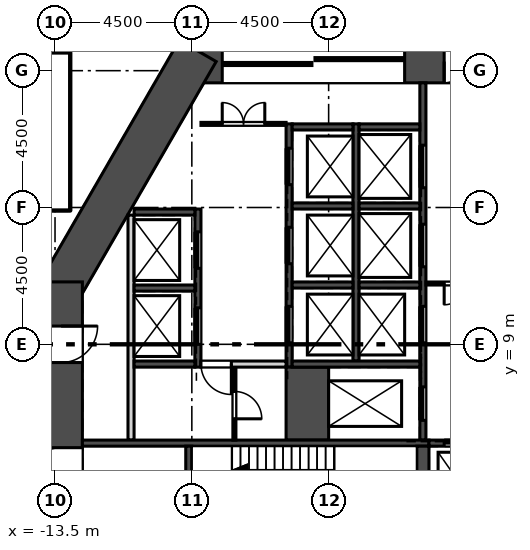
"""IFC4 building model, lengths in metres.
Left out: names, types, materials, properties, quantities, classifications, styles, units other than length and angle.
Written with IfcOpenShell. Run it as: python <this file> out.ifc"""

import sys

from ifc_helpers import new_model, si_unit, direction, frame, frame_2d, origin, place, context, subcontext, project, spatial, rectangle, extrude, element, fill, save


model = new_model("IFC4")
c1 = context("Model", 3, precision=1e-05, world=origin(), true_north=direction((0.0, 1.0)))
c2 = subcontext(c1, "Body", "Model", "MODEL_VIEW")
j1 = project(units=[si_unit("LENGTHUNIT", "METRE"), si_unit("PLANEANGLEUNIT", "RADIAN")], contexts=[c1])
p1 = place(None, origin())
s1 = spatial("IfcSite", under=j1, at=p1, CompositionType="ELEMENT")
p2 = place(p1, origin())
s2 = spatial("IfcBuilding", under=s1, at=p2, CompositionType="ELEMENT")
p3 = place(p2, origin())
s3 = spatial("IfcBuildingStorey", under=s2, at=p3, CompositionType="ELEMENT", Elevation=0.0)
p4 = place(p3, frame((9.412, 18.3, 0.0), z_axis=(0.0, 0.0, 1.0), x_axis=(-1.0, 0.0, 0.0)))
e1 = element("IfcWall", 1, at=p4, inside=s3, PredefinedType="SHEAR", context=c2, shape_type="SweptSolid", body=[
    extrude(rectangle(XDim=18.823, YDim=1.4, at=frame_2d((9.412, 0.0))), origin(), (0.0, 0.0, 1.0), 8.0),
])
p5 = place(p4, frame((8.711, 0.0, 0.0)))
e2 = element("IfcOpeningElement", 2, at=p5, cuts=e1, PredefinedType="OPENING", context=c2, shape_type="SweptSolid", body=[
    extrude(rectangle(XDim=1.4, YDim=2.1, at=frame_2d((0.7, 1.05))), frame((0.0, 0.71, 0.0), z_axis=(0.0, -1.0, 0.0), x_axis=(1.0, 0.0, 0.0)), (0.0, 0.0, 1.0), 1.42),
])
p6 = place(p4, frame((11.412, 0.0, 0.0)))
e3 = element("IfcOpeningElement", 3, at=p6, cuts=e1, PredefinedType="OPENING", context=c2, shape_type="SweptSolid", body=[
    extrude(rectangle(XDim=6.0, YDim=2.4, at=frame_2d((3.0, 1.2))), frame((0.0, 0.71, 0.0), z_axis=(0.0, -1.0, 0.0), x_axis=(1.0, 0.0, 0.0)), (0.0, 0.0, 1.0), 1.42),
])
p7 = place(p4, frame((1.412, 0.0, 0.0)))
e4 = element("IfcOpeningElement", 4, at=p7, cuts=e1, PredefinedType="OPENING", context=c2, shape_type="SweptSolid", body=[
    extrude(rectangle(XDim=6.0, YDim=2.4, at=frame_2d((3.0, 1.2))), frame((0.0, 0.71, 0.0), z_axis=(0.0, -1.0, 0.0), x_axis=(1.0, 0.0, 0.0)), (0.0, 0.0, 1.0), 1.42),
])
p8 = place(p3, frame((-8.805, 18.65, 0.0), z_axis=(0.0, 0.0, 1.0), x_axis=(-0.50000187635, -0.866024320471, 0.0)))
e5 = element("IfcWall", 5, at=p8, inside=s3, PredefinedType="SHEAR", context=c2, shape_type="SweptSolid", body=[
    extrude(rectangle(XDim=9.177, YDim=1.4, at=frame_2d((4.588, 0.0))), origin(), (0.0, 0.0, 1.0), 8.0),
])
p9 = place(p3, frame((-13.3, 11.052, 0.0), z_axis=(0.0, 0.0, 1.0), x_axis=(0.0, -1.0, 0.0)))
e6 = element("IfcWall", 6, at=p9, inside=s3, PredefinedType="SHEAR", context=c2, shape_type="SweptSolid", body=[
    extrude(rectangle(XDim=10.202, YDim=1.4, at=frame_2d((5.101, 0.0))), origin(), (0.0, 0.0, 1.0), 8.0),
])
p10 = place(p9, frame((5.453, 0.0, 0.0)))
e7 = element("IfcOpeningElement", 7, at=p10, cuts=e6, PredefinedType="OPENING", context=c2, shape_type="SweptSolid", body=[
    extrude(rectangle(XDim=1.2, YDim=2.1, at=frame_2d((0.6, 1.05))), frame((0.0, 0.71, 0.0), z_axis=(0.0, -1.0, 0.0), x_axis=(1.0, 0.0, 0.0)), (0.0, 0.0, 1.0), 1.42),
])
p11 = place(p9, frame((1.453, 0.0, 0.0)))
e8 = element("IfcOpeningElement", 8, at=p11, cuts=e6, PredefinedType="OPENING", context=c2, shape_type="SweptSolid", body=[
    extrude(rectangle(XDim=1.2, YDim=2.1, at=frame_2d((0.6, 1.05))), frame((0.0, 0.71, 0.0), z_axis=(0.0, -1.0, 0.0), x_axis=(1.0, 0.0, 0.0)), (0.0, 0.0, 1.0), 1.42),
])
p12 = place(p3, frame((-11.0, 5.85, 0.0), z_axis=(0.0, 0.0, 1.0), x_axis=(0.0, 1.0, 0.0)))
e9 = element("IfcWall", 9, at=p12, inside=s3, PredefinedType="SOLIDWALL", context=c2, shape_type="SweptSolid", body=[
    extrude(rectangle(XDim=7.4, YDim=0.2, at=frame_2d((3.7, 0.0))), origin(), (0.0, 0.0, 1.0), 7.7),
])
p13 = place(p3, frame((-8.8, 8.25, -0.4), z_axis=(0.0, 0.0, 1.0), x_axis=(0.0, 1.0, 0.0)))
e10 = element("IfcWall", 10, at=p13, inside=s3, PredefinedType="SOLIDWALL", context=c2, shape_type="SweptSolid", body=[
    extrude(rectangle(XDim=5.2, YDim=0.2, at=frame_2d((2.6, 0.0))), origin(), (0.0, 0.0, 1.0), 8.1),
])
p14 = place(p13, frame((0.75, 0.0, 0.4)))
e11 = element("IfcOpeningElement", 11, at=p14, cuts=e10, PredefinedType="OPENING", context=c2, shape_type="SweptSolid", body=[
    extrude(rectangle(XDim=1.2, YDim=2.1, at=frame_2d((0.6, 1.05))), frame((0.0, 0.11, 0.0), z_axis=(0.0, -1.0, 0.0), x_axis=(1.0, 0.0, 0.0)), (0.0, 0.0, 1.0), 0.22),
])
p15 = place(p13, frame((3.25, 0.0, 0.4)))
e12 = element("IfcOpeningElement", 12, at=p15, cuts=e10, PredefinedType="OPENING", context=c2, shape_type="SweptSolid", body=[
    extrude(rectangle(XDim=1.2, YDim=2.1, at=frame_2d((0.6, 1.05))), frame((0.0, 0.11, 0.0), z_axis=(0.0, -1.0, 0.0), x_axis=(1.0, 0.0, 0.0)), (0.0, 0.0, 1.0), 0.22),
])
p16 = place(p3, frame((-5.8, 8.25, -0.4), z_axis=(0.0, 0.0, 1.0), x_axis=(0.0, 1.0, 0.0)))
e13 = element("IfcWall", 13, at=p16, inside=s3, PredefinedType="SOLIDWALL", context=c2, shape_type="SweptSolid", body=[
    extrude(rectangle(XDim=8.0, YDim=0.2, at=frame_2d((4.0, 0.0))), origin(), (0.0, 0.0, 1.0), 8.1),
])
p17 = place(p16, frame((0.8, 0.0, 0.4)))
e14 = element("IfcOpeningElement", 14, at=p17, cuts=e13, PredefinedType="OPENING", context=c2, shape_type="SweptSolid", body=[
    extrude(rectangle(XDim=1.2, YDim=2.1, at=frame_2d((0.6, 1.05))), frame((0.0, 0.11, 0.0), z_axis=(0.0, -1.0, 0.0), x_axis=(1.0, 0.0, 0.0)), (0.0, 0.0, 1.0), 0.22),
])
p18 = place(p16, frame((3.4, 0.0, 0.4)))
e15 = element("IfcOpeningElement", 15, at=p18, cuts=e13, PredefinedType="OPENING", context=c2, shape_type="SweptSolid", body=[
    extrude(rectangle(XDim=1.2, YDim=2.1, at=frame_2d((0.6, 1.05))), frame((0.0, 0.11, 0.0), z_axis=(0.0, -1.0, 0.0), x_axis=(1.0, 0.0, 0.0)), (0.0, 0.0, 1.0), 0.22),
])
p19 = place(p16, frame((6.0, 0.0, 0.4)))
e16 = element("IfcOpeningElement", 16, at=p19, cuts=e13, PredefinedType="OPENING", context=c2, shape_type="SweptSolid", body=[
    extrude(rectangle(XDim=1.2, YDim=2.1, at=frame_2d((0.6, 1.05))), frame((0.0, 0.11, 0.0), z_axis=(0.0, -1.0, 0.0), x_axis=(1.0, 0.0, 0.0)), (0.0, 0.0, 1.0), 0.22),
])
p20 = place(p3, frame((-3.6, 8.45, -0.4), z_axis=(0.0, 0.0, 1.0), x_axis=(0.0, 1.0, 0.0)))
e17 = element("IfcWall", 17, at=p20, inside=s3, PredefinedType="SOLIDWALL", context=c2, shape_type="SweptSolid", body=[
    extrude(rectangle(XDim=7.8, YDim=0.2, at=frame_2d((3.9, 0.0))), origin(), (0.0, 0.0, 1.0), 8.1),
])
p21 = place(p3, frame((-1.4, 5.85, -0.4), z_axis=(0.0, 0.0, 1.0), x_axis=(0.0, 1.0, 0.0)))
e18 = element("IfcWall", 18, at=p21, inside=s3, PredefinedType="SOLIDWALL", context=c2, shape_type="SweptSolid", body=[
    extrude(rectangle(XDim=11.75, YDim=0.2, at=frame_2d((5.875, 0.0))), origin(), (0.0, 0.0, 1.0), 8.1),
])
p22 = place(p21, frame((3.2, 0.0, 0.4)))
e19 = element("IfcOpeningElement", 19, at=p22, cuts=e18, PredefinedType="OPENING", context=c2, shape_type="SweptSolid", body=[
    extrude(rectangle(XDim=1.2, YDim=2.1, at=frame_2d((0.6, 1.05))), frame((0.0, 0.11, 0.0), z_axis=(0.0, -1.0, 0.0), x_axis=(1.0, 0.0, 0.0)), (0.0, 0.0, 1.0), 0.22),
])
p23 = place(p21, frame((5.7, 0.0, 0.4)))
e20 = element("IfcOpeningElement", 20, at=p23, cuts=e18, PredefinedType="OPENING", context=c2, shape_type="SweptSolid", body=[
    extrude(rectangle(XDim=1.4, YDim=2.1, at=frame_2d((0.7, 1.05))), frame((0.0, 0.11, 0.0), z_axis=(0.0, -1.0, 0.0), x_axis=(1.0, 0.0, 0.0)), (0.0, 0.0, 1.0), 0.22),
])
p24 = place(p21, frame((8.3, 0.0, 0.4)))
e21 = element("IfcOpeningElement", 21, at=p24, cuts=e18, PredefinedType="OPENING", context=c2, shape_type="SweptSolid", body=[
    extrude(rectangle(XDim=1.4, YDim=2.1, at=frame_2d((0.7, 1.05))), frame((0.0, 0.11, 0.0), z_axis=(0.0, -1.0, 0.0), x_axis=(1.0, 0.0, 0.0)), (0.0, 0.0, 1.0), 0.22),
])
p25 = place(p21, frame((0.65, 0.0, 0.4)))
e22 = element("IfcOpeningElement", 22, at=p25, cuts=e18, PredefinedType="OPENING", context=c2, shape_type="SweptSolid", body=[
    extrude(rectangle(XDim=1.1, YDim=2.1, at=frame_2d((0.55, 1.05))), frame((0.0, 0.11, 0.0), z_axis=(0.0, -1.0, 0.0), x_axis=(1.0, 0.0, 0.0)), (0.0, 0.0, 1.0), 0.22),
])
p26 = place(p3, frame((-5.2, 5.85, -0.4), z_axis=(0.0, 0.0, 1.0), x_axis=(0.0, 1.0, 0.0)))
e23 = element("IfcWall", 23, at=p26, inside=s3, PredefinedType="SOLIDWALL", context=c2, shape_type="SweptSolid", body=[
    extrude(rectangle(XDim=2.4, YDim=1.4, at=frame_2d((1.2, 0.0))), origin(), (0.0, 0.0, 1.0), 8.1),
])
p27 = place(p3, frame((-10.9, 8.35, -0.4), z_axis=(0.0, 0.0, 1.0), x_axis=(1.0, 0.0, 0.0)))
e24 = element("IfcWall", 24, at=p27, inside=s3, PredefinedType="SOLIDWALL", context=c2, shape_type="SweptSolid", body=[
    extrude(rectangle(XDim=2.0, YDim=0.2, at=frame_2d((1.0, 0.0))), origin(), (0.0, 0.0, 1.0), 8.1),
])
p28 = place(p3, frame((-5.7, 8.35, -0.4), z_axis=(0.0, 0.0, 1.0), x_axis=(1.0, 0.0, 0.0)))
e25 = element("IfcWall", 25, at=p28, inside=s3, PredefinedType="SOLIDWALL", context=c2, shape_type="SweptSolid", body=[
    extrude(rectangle(XDim=4.2, YDim=0.2, at=frame_2d((2.1, 0.0))), origin(), (0.0, 0.0, 1.0), 8.1),
])
p29 = place(p3, frame((-12.6, 5.75, -0.4), z_axis=(0.0, 0.0, 1.0), x_axis=(1.0, 0.0, 0.0)))
e26 = element("IfcWall", 26, at=p29, inside=s3, PredefinedType="SOLIDWALL", context=c2, shape_type="SweptSolid", body=[
    extrude(rectangle(XDim=11.4, YDim=0.2, at=frame_2d((5.7, 0.0))), origin(), (0.0, 0.0, 1.0), 8.1),
])
p30 = place(p3, frame((-1.2, 5.75, -0.4), z_axis=(0.0, 0.0, 1.0), x_axis=(1.0, 0.0, 0.0)))
e27 = element("IfcWall", 27, at=p30, inside=s3, PredefinedType="SOLIDWALL", context=c2, shape_type="SweptSolid", body=[
    extrude(rectangle(XDim=2.4, YDim=0.2, at=frame_2d((1.2, 0.0))), origin(), (0.0, 0.0, 1.0), 8.1),
])
p31 = place(p30, frame((0.5, 0.0, 0.4)))
e28 = element("IfcOpeningElement", 28, at=p31, cuts=e27, PredefinedType="OPENING", context=c2, shape_type="SweptSolid", body=[
    extrude(rectangle(XDim=1.4, YDim=2.1, at=frame_2d((0.7, 1.05))), frame((0.0, 0.11, 0.0), z_axis=(0.0, -1.0, 0.0), x_axis=(1.0, 0.0, 0.0)), (0.0, 0.0, 1.0), 0.22),
])
p32 = place(p3, frame((-9.1, 2.25, -0.4), z_axis=(0.0, 0.0, 1.0), x_axis=(0.0, 1.0, 0.0)))
e29 = element("IfcWall", 29, at=p32, inside=s3, PredefinedType="SOLIDWALL", context=c2, shape_type="SweptSolid", body=[
    extrude(rectangle(XDim=3.4, YDim=0.2, at=frame_2d((1.7, 0.0))), origin(), (0.0, 0.0, 1.0), 8.1),
])
p33 = place(p32, frame((0.2, 0.0, 0.4)))
e30 = element("IfcOpeningElement", 30, at=p33, cuts=e29, PredefinedType="OPENING", context=c2, shape_type="SweptSolid", body=[
    extrude(rectangle(XDim=1.2, YDim=2.1, at=frame_2d((0.6, 1.05))), frame((0.0, 0.11, 0.0), z_axis=(0.0, -1.0, 0.0), x_axis=(1.0, 0.0, 0.0)), (0.0, 0.0, 1.0), 0.22),
])
p34 = place(p3, frame((-1.4, 2.25, -0.4), z_axis=(0.0, 0.0, 1.0), x_axis=(0.0, 1.0, 0.0)))
e31 = element("IfcWall", 31, at=p34, inside=s3, PredefinedType="SOLIDWALL", context=c2, shape_type="SweptSolid", body=[
    extrude(rectangle(XDim=3.4, YDim=0.4, at=frame_2d((1.7, 0.0))), origin(), (0.0, 0.0, 1.0), 8.1),
])
for number, where, z_axis, x_axis in (
    (32, (-10.9, 10.85, -0.4), (0.0, 0.0, 1.0), (1.0, 0.0, 0.0)),
    (33, (-10.9, 13.35, -0.4), (0.0, 0.0, 1.0), (1.0, 0.0, 0.0)),
    (34, (-5.7, 10.95, -0.4), (0.0, 0.0, 1.0), (1.0, 0.0, 0.0)),
    (35, (-5.7, 13.55, -0.4), (0.0, 0.0, 1.0), (1.0, 0.0, 0.0)),
    (36, (-5.7, 16.15, -0.4), (0.0, 0.0, 1.0), (1.0, 0.0, 0.0)),
    (37, (-3.5, 10.95, -0.4), (0.0, 0.0, 1.0), (1.0, 0.0, 0.0)),
    (38, (-3.5, 13.55, -0.4), (0.0, 0.0, 1.0), (1.0, 0.0, 0.0)),
    (39, (-3.5, 16.15, -0.4), (0.0, 0.0, 1.0), (1.0, 0.0, 0.0)),
):
    element("IfcWall", number, at=place(p3, frame(where, z_axis=z_axis, x_axis=x_axis)), inside=s3, PredefinedType="SOLIDWALL", context=c2, shape_type="SweptSolid", body=[
        extrude(rectangle(XDim=2.0, YDim=0.2, at=frame_2d((1.0, 0.0))), origin(), (0.0, 0.0, 1.0), 8.1),
    ])
p35 = place(p3, frame((-8.7, 16.25, 0.0), z_axis=(0.0, 0.0, 1.0), x_axis=(1.0, 0.0, 0.0)))
e40 = element("IfcWall", 40, at=p35, inside=s3, PredefinedType="PARTITIONING", context=c2, shape_type="SweptSolid", body=[
    extrude(rectangle(XDim=2.8, YDim=0.1, at=frame_2d((1.4, 0.0))), origin(), (0.0, 0.0, 1.0), 7.7),
])
p36 = place(p35, frame((0.7, 0.0, 0.0)))
e41 = element("IfcOpeningElement", 41, at=p36, cuts=e40, PredefinedType="OPENING", context=c2, shape_type="SweptSolid", body=[
    extrude(rectangle(XDim=1.4, YDim=2.1, at=frame_2d((0.7, 1.05))), frame((0.0, 0.06, 0.0), z_axis=(0.0, -1.0, 0.0), x_axis=(1.0, 0.0, 0.0)), (0.0, 0.0, 1.0), 0.12),
])
p37 = place(p3, frame((-7.6, 5.85, 0.0), z_axis=(0.0, 0.0, 1.0), x_axis=(0.0, 1.0, 0.0)))
e42 = element("IfcWall", 42, at=p37, inside=s3, PredefinedType="PARTITIONING", context=c2, shape_type="SweptSolid", body=[
    extrude(rectangle(XDim=2.4, YDim=0.1, at=frame_2d((1.2, 0.0))), origin(), (0.0, 0.0, 1.0), 7.7),
])
p38 = place(p37, frame((0.7, 0.0, 0.0)))
e43 = element("IfcOpeningElement", 43, at=p38, cuts=e42, PredefinedType="OPENING", context=c2, shape_type="SweptSolid", body=[
    extrude(rectangle(XDim=0.9, YDim=2.1, at=frame_2d((0.45, 1.05))), frame((0.0, 0.06, 0.0), z_axis=(0.0, -1.0, 0.0), x_axis=(1.0, 0.0, 0.0)), (0.0, 0.0, 1.0), 0.12),
])
p39 = place(p3, frame((-8.7, 8.35, 0.0), z_axis=(0.0, 0.0, 1.0), x_axis=(1.0, 0.0, 0.0)))
e44 = element("IfcWall", 44, at=p39, inside=s3, PredefinedType="SOLIDWALL", context=c2, shape_type="SweptSolid", body=[
    extrude(rectangle(XDim=2.8, YDim=0.2, at=frame_2d((1.4, 0.0))), origin(), (0.0, 0.0, 1.0), 7.7),
])
p40 = place(p39, origin())
e45 = element("IfcOpeningElement", 45, at=p40, cuts=e44, PredefinedType="OPENING", context=c2, shape_type="SweptSolid", body=[
    extrude(rectangle(XDim=1.0, YDim=2.1, at=frame_2d((0.5, 1.05))), frame((0.0, 0.11, 0.0), z_axis=(0.0, -1.0, 0.0), x_axis=(1.0, 0.0, 0.0)), (0.0, 0.0, 1.0), 0.22),
])
p41 = place(p3, frame((-1.3, 11.0, 0.0), z_axis=(0.0, 0.0, 1.0), x_axis=(1.0, 0.0, 0.0)))
e46 = element("IfcWall", 46, at=p41, inside=s3, PredefinedType="PARTITIONING", context=c2, shape_type="SweptSolid", body=[
    extrude(rectangle(XDim=2.6, YDim=0.1, at=frame_2d((1.3, 0.0))), origin(), (0.0, 0.0, 1.0), 7.7),
])
p42 = place(p41, frame((0.6, 0.0, 0.0)))
e47 = element("IfcOpeningElement", 47, at=p42, cuts=e46, PredefinedType="OPENING", context=c2, shape_type="SweptSolid", body=[
    extrude(rectangle(XDim=1.4, YDim=2.1, at=frame_2d((0.7, 1.05))), frame((0.0, 0.06, 0.0), z_axis=(0.0, -1.0, 0.0), x_axis=(1.0, 0.0, 0.0)), (0.0, 0.0, 1.0), 0.12),
])
p43 = place(p3, frame((-13.125, 13.45, 0.0), z_axis=(0.0, 0.0, 1.0), x_axis=(0.0, 1.0, 0.0)))
e48 = element("IfcWall", 48, at=p43, inside=s3, PredefinedType="SOLIDWALL", context=c2, shape_type="SweptSolid", body=[
    extrude(rectangle(XDim=5.1, YDim=0.25, at=frame_2d((2.55, 0.0))), origin(), (0.0, 0.0, 1.0), 7.7),
])
for number, where, z_axis, x_axis in (
    (49, (-13.125, 13.525, 0.0), (0.0, 0.0, 1.0), (-1.0, 0.0, 0.0)),
    (50, (-13.125, 18.475, 0.0), (0.0, 0.0, 1.0), (-1.0, 0.0, 0.0)),
):
    element("IfcWall", number, at=place(p3, frame(where, z_axis=z_axis, x_axis=x_axis)), inside=s3, PredefinedType="SOLIDWALL", context=c2, shape_type="SweptSolid", body=[
        extrude(rectangle(XDim=2.45, YDim=0.25, at=frame_2d((1.225, 0.0))), origin(), (0.0, 0.0, 1.0), 7.7),
    ])
p44 = place(p14, origin())
e51 = element("IfcDoor", 51, at=p44, inside=s3, OperationType="SLIDING_TO_LEFT", PredefinedType="DOOR", context=c2, shape_type="SweptSolid", body=[
    extrude(rectangle(XDim=1.2, YDim=2.1, at=frame_2d((0.6, 1.05))), frame((0.0, 0.025, 0.0), z_axis=(0.0, -1.0, 0.0), x_axis=(1.0, 0.0, 0.0)), (0.0, 0.0, 1.0), 0.05),
])
fill(e11, e51)
p45 = place(p15, origin())
e52 = element("IfcDoor", 52, at=p45, inside=s3, OperationType="SLIDING_TO_LEFT", PredefinedType="DOOR", context=c2, shape_type="SweptSolid", body=[
    extrude(rectangle(XDim=1.2, YDim=2.1, at=frame_2d((0.6, 1.05))), frame((0.0, 0.025, 0.0), z_axis=(0.0, -1.0, 0.0), x_axis=(1.0, 0.0, 0.0)), (0.0, 0.0, 1.0), 0.05),
])
fill(e12, e52)
p46 = place(p17, origin())
e53 = element("IfcDoor", 53, at=p46, inside=s3, OperationType="SLIDING_TO_LEFT", PredefinedType="DOOR", context=c2, shape_type="SweptSolid", body=[
    extrude(rectangle(XDim=1.2, YDim=2.1, at=frame_2d((0.6, 1.05))), frame((0.0, 0.025, 0.0), z_axis=(0.0, -1.0, 0.0), x_axis=(1.0, 0.0, 0.0)), (0.0, 0.0, 1.0), 0.05),
])
fill(e14, e53)
p47 = place(p18, origin())
e54 = element("IfcDoor", 54, at=p47, inside=s3, OperationType="SLIDING_TO_LEFT", PredefinedType="DOOR", context=c2, shape_type="SweptSolid", body=[
    extrude(rectangle(XDim=1.2, YDim=2.1, at=frame_2d((0.6, 1.05))), frame((0.0, 0.025, 0.0), z_axis=(0.0, -1.0, 0.0), x_axis=(1.0, 0.0, 0.0)), (0.0, 0.0, 1.0), 0.05),
])
fill(e15, e54)
p48 = place(p19, origin())
e55 = element("IfcDoor", 55, at=p48, inside=s3, OperationType="SLIDING_TO_LEFT", PredefinedType="DOOR", context=c2, shape_type="SweptSolid", body=[
    extrude(rectangle(XDim=1.2, YDim=2.1, at=frame_2d((0.6, 1.05))), frame((0.0, 0.025, 0.0), z_axis=(0.0, -1.0, 0.0), x_axis=(1.0, 0.0, 0.0)), (0.0, 0.0, 1.0), 0.05),
])
fill(e16, e55)
p49 = place(p22, origin())
e56 = element("IfcDoor", 56, at=p49, inside=s3, OperationType="SLIDING_TO_LEFT", PredefinedType="DOOR", context=c2, shape_type="SweptSolid", body=[
    extrude(rectangle(XDim=1.2, YDim=2.1, at=frame_2d((0.6, 1.05))), frame((0.0, 0.025, 0.0), z_axis=(0.0, -1.0, 0.0), x_axis=(1.0, 0.0, 0.0)), (0.0, 0.0, 1.0), 0.05),
])
fill(e19, e56)
p50 = place(p23, origin())
e57 = element("IfcDoor", 57, at=p50, inside=s3, OperationType="SLIDING_TO_LEFT", PredefinedType="DOOR", context=c2, shape_type="SweptSolid", body=[
    extrude(rectangle(XDim=1.4, YDim=2.1, at=frame_2d((0.7, 1.05))), frame((0.0, 0.025, 0.0), z_axis=(0.0, -1.0, 0.0), x_axis=(1.0, 0.0, 0.0)), (0.0, 0.0, 1.0), 0.05),
])
fill(e20, e57)
p51 = place(p24, origin())
e58 = element("IfcDoor", 58, at=p51, inside=s3, OperationType="SLIDING_TO_LEFT", PredefinedType="DOOR", context=c2, shape_type="SweptSolid", body=[
    extrude(rectangle(XDim=1.4, YDim=2.1, at=frame_2d((0.7, 1.05))), frame((0.0, 0.025, 0.0), z_axis=(0.0, -1.0, 0.0), x_axis=(1.0, 0.0, 0.0)), (0.0, 0.0, 1.0), 0.05),
])
fill(e21, e58)
p52 = place(p25, origin())
e59 = element("IfcDoor", 59, at=p52, inside=s3, OperationType="SLIDING_TO_RIGHT", PredefinedType="DOOR", context=c2, shape_type="SweptSolid", body=[
    extrude(rectangle(XDim=1.1, YDim=2.1, at=frame_2d((0.55, 1.05))), frame((0.0, 0.025, 0.0), z_axis=(0.0, -1.0, 0.0), x_axis=(1.0, 0.0, 0.0)), (0.0, 0.0, 1.0), 0.05),
])
fill(e22, e59)
p53 = place(p31, origin())
e60 = element("IfcDoor", 60, at=p53, inside=s3, OperationType="SLIDING_TO_LEFT", PredefinedType="DOOR", context=c2, shape_type="SweptSolid", body=[
    extrude(rectangle(XDim=1.4, YDim=2.1, at=frame_2d((0.7, 1.05))), frame((0.0, 0.025, 0.0), z_axis=(0.0, -1.0, 0.0), x_axis=(1.0, 0.0, 0.0)), (0.0, 0.0, 1.0), 0.05),
])
fill(e28, e60)
p54 = place(p36, origin())
e61 = element("IfcDoor", 61, at=p54, inside=s3, OperationType="DOUBLE_DOOR_SINGLE_SWING", PredefinedType="DOOR", context=c2, shape_type="SweptSolid", body=[
    extrude(rectangle(XDim=1.4, YDim=2.1, at=frame_2d((0.7, 1.05))), frame((0.0, 0.025, 0.0), z_axis=(0.0, -1.0, 0.0), x_axis=(1.0, 0.0, 0.0)), (0.0, 0.0, 1.0), 0.05),
])
fill(e41, e61)
p55 = place(p40, frame((1.0, 0.0, 0.0), z_axis=(0.0, 0.0, 1.0), x_axis=(-1.0, 0.0, 0.0)))
e62 = element("IfcDoor", 62, at=p55, inside=s3, OperationType="SINGLE_SWING_LEFT", PredefinedType="DOOR", context=c2, shape_type="SweptSolid", body=[
    extrude(rectangle(XDim=1.0, YDim=2.1, at=frame_2d((0.5, 1.05))), frame((0.0, 0.025, 0.0), z_axis=(0.0, -1.0, 0.0), x_axis=(1.0, 0.0, 0.0)), (0.0, 0.0, 1.0), 0.05),
])
fill(e45, e62)
p56 = place(p38, frame((0.9, 0.0, 0.0), z_axis=(0.0, 0.0, 1.0), x_axis=(-1.0, 0.0, 0.0)))
e63 = element("IfcDoor", 63, at=p56, inside=s3, OperationType="SINGLE_SWING_RIGHT", PredefinedType="DOOR", context=c2, shape_type="SweptSolid", body=[
    extrude(rectangle(XDim=0.9, YDim=2.1, at=frame_2d((0.45, 1.05))), frame((0.0, 0.025, 0.0), z_axis=(0.0, -1.0, 0.0), x_axis=(1.0, 0.0, 0.0)), (0.0, 0.0, 1.0), 0.05),
])
fill(e43, e63)
p57 = place(p11, origin())
e64 = element("IfcDoor", 64, at=p57, inside=s3, OperationType="SINGLE_SWING_LEFT", PredefinedType="DOOR", context=c2, shape_type="SweptSolid", body=[
    extrude(rectangle(XDim=1.2, YDim=2.1, at=frame_2d((0.6, 1.05))), frame((0.0, 0.025, 0.0), z_axis=(0.0, -1.0, 0.0), x_axis=(1.0, 0.0, 0.0)), (0.0, 0.0, 1.0), 0.05),
])
fill(e8, e64)
p58 = place(p42, frame((1.4, 0.0, 0.0), z_axis=(0.0, 0.0, 1.0), x_axis=(-1.0, 0.0, 0.0)))
e65 = element("IfcDoor", 65, at=p58, inside=s3, OperationType="DOUBLE_DOOR_SINGLE_SWING", PredefinedType="DOOR", context=c2, shape_type="SweptSolid", body=[
    extrude(rectangle(XDim=1.4, YDim=2.1, at=frame_2d((0.7, 1.05))), frame((0.0, 0.025, 0.0), z_axis=(0.0, -1.0, 0.0), x_axis=(1.0, 0.0, 0.0)), (0.0, 0.0, 1.0), 0.05),
])
fill(e47, e65)
p59 = place(p5, origin())
e66 = element("IfcDoor", 66, at=p59, inside=s3, OperationType="DOUBLE_DOOR_SINGLE_SWING", PredefinedType="DOOR", context=c2, shape_type="SweptSolid", body=[
    extrude(rectangle(XDim=1.4, YDim=2.1, at=frame_2d((0.7, 1.05))), frame((0.0, 0.025, 0.0), z_axis=(0.0, -1.0, 0.0), x_axis=(1.0, 0.0, 0.0)), (0.0, 0.0, 1.0), 0.05),
])
fill(e2, e66)
p60 = place(p6, origin())
e67 = element("IfcDoor", 67, at=p60, inside=s3, OperationType="DOUBLE_DOOR_SLIDING", PredefinedType="DOOR", context=c2, shape_type="SweptSolid", body=[
    extrude(rectangle(XDim=6.0, YDim=2.4, at=frame_2d((3.0, 1.2))), frame((0.0, 0.025, 0.0), z_axis=(0.0, -1.0, 0.0), x_axis=(1.0, 0.0, 0.0)), (0.0, 0.0, 1.0), 0.05),
])
fill(e3, e67)
save(model, sys.argv[1])
